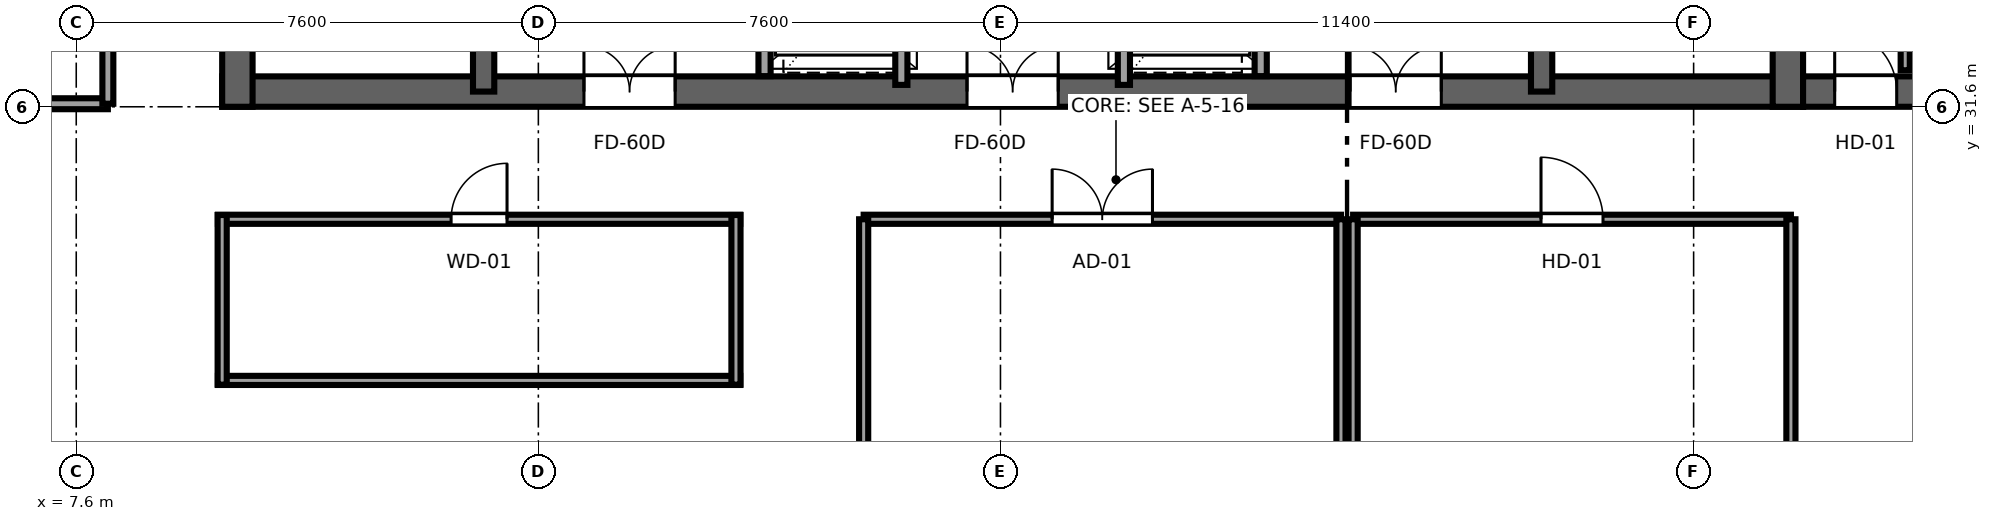
"""IFC4 building model, lengths in metres.
Left out: names, types, materials, properties, quantities, classifications, styles, units other than length and angle.
Written with IfcOpenShell. Run it as: python <this file> out.ifc"""

import sys

from ifc_helpers import new_model, si_unit, direction, frame, frame_2d, origin, place, context, subcontext, project, spatial, rectangle, extrude, source, transform, mapped, element, fill, save


model = new_model("IFC4")
c1 = context("Model", 3, precision=1e-05, world=origin(), true_north=direction((0.0, 1.0)))
c2 = subcontext(c1, "Body", "Model", "MODEL_VIEW")
j1 = project(units=[si_unit("LENGTHUNIT", "METRE"), si_unit("PLANEANGLEUNIT", "RADIAN")], contexts=[c1])
p1 = place(None, origin())
s1 = spatial("IfcSite", under=j1, at=p1, CompositionType="ELEMENT")
p2 = place(p1, origin())
s2 = spatial("IfcBuilding", under=s1, at=p2, CompositionType="ELEMENT")
p3 = place(p2, frame((0.0, 0.0, 234.55)))
s3 = spatial("IfcBuildingStorey", under=s2, at=p3, CompositionType="ELEMENT", Elevation=234.55)
p4 = place(p3, frame((10.0, 31.85, 0.0), z_axis=(0.0, 0.0, 1.0), x_axis=(1.0, 0.0, 0.0)))
e1 = element("IfcWall", 1, at=p4, inside=s3, PredefinedType="SHEAR", context=c2, shape_type="SweptSolid", body=[
    extrude(rectangle(XDim=26.0, YDim=0.5, at=frame_2d((13.0, 0.0))), origin(), (0.0, 0.0, 1.0), 3.55),
])
p5 = place(p4, frame((7.45, 0.0, 0.0), z_axis=(0.0, 0.0, 1.0), x_axis=(-1.0, 0.0, 0.0)))
e2 = element("IfcOpeningElement", 2, at=p5, cuts=e1, PredefinedType="OPENING", context=c2, shape_type="SweptSolid", body=[
    extrude(rectangle(XDim=1.5, YDim=2.04, at=frame_2d((0.75, 1.02))), frame((0.0, 0.26, 0.0), z_axis=(0.0, -1.0, 0.0), x_axis=(1.0, 0.0, 0.0)), (0.0, 0.0, 1.0), 0.52),
])
p6 = place(p4, frame((13.75, 0.0, 0.0), z_axis=(0.0, 0.0, 1.0), x_axis=(-1.0, 0.0, 0.0)))
e3 = element("IfcOpeningElement", 3, at=p6, cuts=e1, PredefinedType="OPENING", context=c2, shape_type="SweptSolid", body=[
    extrude(rectangle(XDim=1.5, YDim=2.04, at=frame_2d((0.75, 1.02))), frame((0.0, 0.26, 0.0), z_axis=(0.0, -1.0, 0.0), x_axis=(1.0, 0.0, 0.0)), (0.0, 0.0, 1.0), 0.52),
])
p7 = place(p4, frame((20.05, 0.0, 0.0), z_axis=(0.0, 0.0, 1.0), x_axis=(-1.0, 0.0, 0.0)))
e4 = element("IfcOpeningElement", 4, at=p7, cuts=e1, PredefinedType="OPENING", context=c2, shape_type="SweptSolid", body=[
    extrude(rectangle(XDim=1.5, YDim=2.04, at=frame_2d((0.75, 1.02))), frame((0.0, 0.26, 0.0), z_axis=(0.0, -1.0, 0.0), x_axis=(1.0, 0.0, 0.0)), (0.0, 0.0, 1.0), 0.52),
])
for number, where, z_axis, x_axis in (
    (5, (10.25, 31.6, 0.0), (0.0, 0.0, 1.0), (0.0, 1.0, 0.0)),
    (6, (35.75, 31.6, 0.0), (0.0, 0.0, 1.0), (0.0, 1.0, 0.0)),
):
    element("IfcWall", number, at=place(p3, frame(where, z_axis=z_axis, x_axis=x_axis)), inside=s3, PredefinedType="SHEAR", context=c2, shape_type="SweptSolid", body=[
        extrude(rectangle(XDim=13.6, YDim=0.5, at=frame_2d((6.8, 0.0))), origin(), (0.0, 0.0, 1.0), 3.55),
    ])
p8 = place(p3, frame((14.3, 31.85, 0.0), z_axis=(0.0, 0.0, 1.0), x_axis=(0.0, 1.0, 0.0)))
e7 = element("IfcWall", 7, at=p8, inside=s3, PredefinedType="SHEAR", context=c2, shape_type="SweptSolid", body=[
    extrude(rectangle(XDim=13.1, YDim=0.35, at=frame_2d((6.55, 0.0))), origin(), (0.0, 0.0, 1.0), 3.55),
])
p9 = place(p8, frame((0.7, 0.0, 0.0)))
e8 = element("IfcOpeningElement", 8, at=p9, cuts=e7, PredefinedType="OPENING", context=c2, shape_type="SweptSolid", body=[
    extrude(rectangle(XDim=1.1, YDim=2.12, at=frame_2d((0.55, 1.06))), frame((0.0, 0.185, 0.0), z_axis=(0.0, -1.0, 0.0), x_axis=(1.0, 0.0, 0.0)), (0.0, 0.0, 1.0), 0.37),
])
p10 = place(p3, frame((31.7, 31.85, 0.0), z_axis=(0.0, 0.0, 1.0), x_axis=(0.0, 1.0, 0.0)))
e9 = element("IfcWall", 9, at=p10, inside=s3, PredefinedType="SHEAR", context=c2, shape_type="SweptSolid", body=[
    extrude(rectangle(XDim=13.1, YDim=0.35, at=frame_2d((6.55, 0.0))), origin(), (0.0, 0.0, 1.0), 3.55),
])
p11 = place(p10, frame((1.8, 0.0, 0.0), z_axis=(0.0, 0.0, 1.0), x_axis=(-1.0, 0.0, 0.0)))
e10 = element("IfcOpeningElement", 10, at=p11, cuts=e9, PredefinedType="OPENING", context=c2, shape_type="SweptSolid", body=[
    extrude(rectangle(XDim=1.1, YDim=2.12, at=frame_2d((0.55, 1.06))), frame((0.0, 0.185, 0.0), z_axis=(0.0, -1.0, 0.0), x_axis=(1.0, 0.0, 0.0)), (0.0, 0.0, 1.0), 0.37),
])
p12 = place(p3, frame((36.0, 31.85, 0.0), z_axis=(0.0, 0.0, 1.0), x_axis=(1.0, 0.0, 0.0)))
e11 = element("IfcWall", 11, at=p12, inside=s3, PredefinedType="SHEAR", context=c2, shape_type="SweptSolid", body=[
    extrude(rectangle(XDim=3.8, YDim=0.5, at=frame_2d((1.9, 0.0))), origin(), (0.0, 0.0, 1.0), 3.55),
])
p13 = place(p12, frame((1.54, 0.0, 0.0), z_axis=(0.0, 0.0, 1.0), x_axis=(-1.0, 0.0, 0.0)))
e12 = element("IfcOpeningElement", 12, at=p13, cuts=e11, PredefinedType="OPENING", context=c2, shape_type="SweptSolid", body=[
    extrude(rectangle(XDim=1.02, YDim=2.03, at=frame_2d((0.51, 1.015))), frame((0.0, 0.26, 0.0), z_axis=(0.0, -1.0, 0.0), x_axis=(1.0, 0.0, 0.0)), (0.0, 0.0, 1.0), 0.52),
])
for number, where, z_axis, x_axis in (
    (13, (18.92, 32.104, 0.0), (0.0, 0.0, 1.0), (0.0, 1.0, 0.0)),
    (14, (27.08, 32.104, 0.0), (0.0, 0.0, 1.0), (0.0, 1.0, 0.0)),
):
    element("IfcWall", number, at=place(p3, frame(where, z_axis=z_axis, x_axis=x_axis)), inside=s3, PredefinedType="SOLIDWALL", context=c2, shape_type="SweptSolid", body=[
        extrude(rectangle(XDim=4.046, YDim=0.2, at=frame_2d((2.023, 0.0))), origin(), (0.0, 0.0, 1.0), 3.37),
    ])
p14 = place(p3, frame((21.17, 31.96, 0.0), z_axis=(0.0, 0.0, 1.0), x_axis=(0.0, 1.0, 0.0)))
e15 = element("IfcWall", 15, at=p14, inside=s3, PredefinedType="SOLIDWALL", context=c2, shape_type="SweptSolid", body=[
    extrude(rectangle(XDim=5.08, YDim=0.2, at=frame_2d((2.54, 0.0))), origin(), (0.0, 0.0, 1.0), 3.37),
])
p15 = place(p14, frame((0.74, 0.0, 0.0)))
e16 = element("IfcOpeningElement", 16, at=p15, cuts=e15, PredefinedType="OPENING", context=c2, shape_type="SweptSolid", body=[
    extrude(rectangle(XDim=1.1, YDim=2.12, at=frame_2d((0.55, 1.06))), frame((0.0, 0.11, 0.0), z_axis=(0.0, -1.0, 0.0), x_axis=(1.0, 0.0, 0.0)), (0.0, 0.0, 1.0), 0.22),
])
p16 = place(p14, frame((3.24, 0.0, 0.0)))
e17 = element("IfcOpeningElement", 17, at=p16, cuts=e15, PredefinedType="OPENING", context=c2, shape_type="SweptSolid", body=[
    extrude(rectangle(XDim=1.1, YDim=2.12, at=frame_2d((0.55, 1.06))), frame((0.0, 0.11, 0.0), z_axis=(0.0, -1.0, 0.0), x_axis=(1.0, 0.0, 0.0)), (0.0, 0.0, 1.0), 0.22),
])
p17 = place(p3, frame((24.83, 31.96, 0.0), z_axis=(0.0, 0.0, 1.0), x_axis=(0.0, 1.0, 0.0)))
e18 = element("IfcWall", 18, at=p17, inside=s3, PredefinedType="SOLIDWALL", context=c2, shape_type="SweptSolid", body=[
    extrude(rectangle(XDim=5.08, YDim=0.2, at=frame_2d((2.54, 0.0))), origin(), (0.0, 0.0, 1.0), 3.37),
])
p18 = place(p17, frame((0.74, 0.0, 0.0)))
e19 = element("IfcOpeningElement", 19, at=p18, cuts=e18, PredefinedType="OPENING", context=c2, shape_type="SweptSolid", body=[
    extrude(rectangle(XDim=1.1, YDim=2.12, at=frame_2d((0.55, 1.06))), frame((0.0, 0.11, 0.0), z_axis=(0.0, -1.0, 0.0), x_axis=(1.0, 0.0, 0.0)), (0.0, 0.0, 1.0), 0.22),
])
p19 = place(p17, frame((3.24, 0.0, 0.0)))
e20 = element("IfcOpeningElement", 20, at=p19, cuts=e18, PredefinedType="OPENING", context=c2, shape_type="SweptSolid", body=[
    extrude(rectangle(XDim=1.1, YDim=2.12, at=frame_2d((0.55, 1.06))), frame((0.0, 0.11, 0.0), z_axis=(0.0, -1.0, 0.0), x_axis=(1.0, 0.0, 0.0)), (0.0, 0.0, 1.0), 0.22),
])
p20 = place(p3, frame((37.68, 32.2, 0.0), z_axis=(0.0, 0.0, 1.0), x_axis=(0.0, 1.0, 0.0)))
e21 = element("IfcWall", 21, at=p20, inside=s3, PredefinedType="PARTITIONING", context=c2, shape_type="SweptSolid", body=[
    extrude(rectangle(XDim=8.0, YDim=0.15, at=frame_2d((4.0, 0.0))), origin(), (0.0, 0.0, 1.0), 3.37),
])
p21 = place(p20, frame((3.49, 0.0, 0.0)))
e22 = element("IfcOpeningElement", 22, at=p21, cuts=e21, PredefinedType="OPENING", context=c2, shape_type="SweptSolid", body=[
    extrude(rectangle(XDim=1.02, YDim=2.03, at=frame_2d((0.51, 1.015))), frame((0.0, 0.085, 0.0), z_axis=(0.0, -1.0, 0.0), x_axis=(1.0, 0.0, 0.0)), (0.0, 0.0, 1.0), 0.17),
])
p22 = place(p3, frame((3.005, 31.65, 0.0), z_axis=(0.0, 0.0, 1.0), x_axis=(1.0, 0.0, 0.0)))
e23 = element("IfcWall", 23, at=p22, inside=s3, PredefinedType="PARTITIONING", context=c2, shape_type="SweptSolid", body=[
    extrude(rectangle(XDim=5.115, YDim=0.18, at=frame_2d((2.558, 0.0))), origin(), (0.0, 0.0, 1.0), 3.37),
])
p23 = place(p3, frame((8.12, 31.65, 0.0), z_axis=(0.0, 0.0, 1.0), x_axis=(0.0, 1.0, 0.0)))
e24 = element("IfcWall", 24, at=p23, inside=s3, PredefinedType="PARTITIONING", context=c2, shape_type="SweptSolid", body=[
    extrude(rectangle(XDim=4.95, YDim=0.18, at=frame_2d((2.475, 0.0))), origin(), (0.0, 0.0, 1.0), 3.37),
])
p24 = place(p23, frame((3.0, 0.0, 0.0)))
e25 = element("IfcOpeningElement", 25, at=p24, cuts=e24, PredefinedType="OPENING", context=c2, shape_type="SweptSolid", body=[
    extrude(rectangle(XDim=1.65, YDim=2.15, at=frame_2d((0.825, 1.075))), frame((0.0, 0.1, 0.0), z_axis=(0.0, -1.0, 0.0), x_axis=(1.0, 0.0, 0.0)), (0.0, 0.0, 1.0), 0.2),
])
p25 = place(p3, frame((9.93, 27.1, 0.0), z_axis=(0.0, 0.0, 1.0), x_axis=(1.0, 0.0, 0.0)))
e26 = element("IfcWall", 26, at=p25, inside=s3, PredefinedType="PARTITIONING", context=c2, shape_type="SweptSolid", body=[
    extrude(rectangle(XDim=8.59, YDim=0.15, at=frame_2d((4.295, 0.0))), origin(), (0.0, 0.0, 1.0), 3.37),
])
p26 = place(p3, frame((9.93, 29.75, 0.0), z_axis=(0.0, 0.0, 1.0), x_axis=(1.0, 0.0, 0.0)))
e27 = element("IfcWall", 27, at=p26, inside=s3, PredefinedType="PARTITIONING", context=c2, shape_type="SweptSolid", body=[
    extrude(rectangle(XDim=8.59, YDim=0.15, at=frame_2d((4.295, 0.0))), origin(), (0.0, 0.0, 1.0), 3.37),
])
p27 = place(p26, frame((3.835, 0.0, 0.0)))
e28 = element("IfcOpeningElement", 28, at=p27, cuts=e27, PredefinedType="OPENING", context=c2, shape_type="SweptSolid", body=[
    extrude(rectangle(XDim=0.92, YDim=2.01, at=frame_2d((0.46, 1.005))), frame((0.0, 0.085, 0.0), z_axis=(0.0, -1.0, 0.0), x_axis=(1.0, 0.0, 0.0)), (0.0, 0.0, 1.0), 0.17),
])
for number, where, z_axis, x_axis in (
    (29, (10.0, 27.03, 0.0), (0.0, 0.0, 1.0), (0.0, 1.0, 0.0)),
    (30, (18.45, 27.03, 0.0), (0.0, 0.0, 1.0), (0.0, 1.0, 0.0)),
):
    element("IfcWall", number, at=place(p3, frame(where, z_axis=z_axis, x_axis=x_axis)), inside=s3, PredefinedType="PARTITIONING", context=c2, shape_type="SweptSolid", body=[
        extrude(rectangle(XDim=2.79, YDim=0.15, at=frame_2d((1.395, 0.0))), origin(), (0.0, 0.0, 1.0), 3.37),
    ])
p28 = place(p3, frame((20.55, 29.75, 0.0), z_axis=(0.0, 0.0, 1.0), x_axis=(1.0, 0.0, 0.0)))
e31 = element("IfcWall", 31, at=p28, inside=s3, PredefinedType="PARTITIONING", context=c2, shape_type="SweptSolid", body=[
    extrude(rectangle(XDim=7.85, YDim=0.15, at=frame_2d((3.925, 0.0))), origin(), (0.0, 0.0, 1.0), 3.37),
])
p29 = place(p28, frame((3.1, 0.0, 0.0)))
e32 = element("IfcOpeningElement", 32, at=p29, cuts=e31, PredefinedType="OPENING", context=c2, shape_type="SweptSolid", body=[
    extrude(rectangle(XDim=1.65, YDim=2.15, at=frame_2d((0.825, 1.075))), frame((0.0, 0.085, 0.0), z_axis=(0.0, -1.0, 0.0), x_axis=(1.0, 0.0, 0.0)), (0.0, 0.0, 1.0), 0.17),
])
p30 = place(p3, frame((20.55, 25.0, 0.0), z_axis=(0.0, 0.0, 1.0), x_axis=(0.0, 1.0, 0.0)))
e33 = element("IfcWall", 33, at=p30, inside=s3, PredefinedType="PARTITIONING", context=c2, shape_type="SweptSolid", body=[
    extrude(rectangle(XDim=4.75, YDim=0.15, at=frame_2d((2.375, 0.0))), origin(), (0.0, 0.0, 1.0), 3.37),
])
p31 = place(p3, frame((28.4, 25.0, 0.0), z_axis=(0.0, 0.0, 1.0), x_axis=(0.0, 1.0, 0.0)))
e34 = element("IfcWall", 34, at=p31, inside=s3, PredefinedType="PARTITIONING", context=c2, shape_type="SweptSolid", body=[
    extrude(rectangle(XDim=4.75, YDim=0.15, at=frame_2d((2.375, 0.0))), origin(), (0.0, 0.0, 1.0), 2.758),
])
p32 = place(p3, frame((28.6, 29.75, 0.0), z_axis=(0.0, 0.0, 1.0), x_axis=(1.0, 0.0, 0.0)))
e35 = element("IfcWall", 35, at=p32, inside=s3, PredefinedType="PARTITIONING", context=c2, shape_type="SweptSolid", body=[
    extrude(rectangle(XDim=7.2, YDim=0.15, at=frame_2d((3.6, 0.0))), origin(), (0.0, 0.0, 1.0), 3.37),
])
p33 = place(p32, frame((3.09, 0.0, 0.0)))
e36 = element("IfcOpeningElement", 36, at=p33, cuts=e35, PredefinedType="OPENING", context=c2, shape_type="SweptSolid", body=[
    extrude(rectangle(XDim=1.02, YDim=2.03, at=frame_2d((0.51, 1.015))), frame((0.0, 0.085, 0.0), z_axis=(0.0, -1.0, 0.0), x_axis=(1.0, 0.0, 0.0)), (0.0, 0.0, 1.0), 0.17),
])
p34 = place(p3, frame((28.6, 25.0, 0.0), z_axis=(0.0, 0.0, 1.0), x_axis=(0.0, 1.0, 0.0)))
e37 = element("IfcWall", 37, at=p34, inside=s3, PredefinedType="PARTITIONING", context=c2, shape_type="SweptSolid", body=[
    extrude(rectangle(XDim=4.75, YDim=0.15, at=frame_2d((2.375, 0.0))), origin(), (0.0, 0.0, 1.0), 2.758),
])
p35 = place(p3, frame((35.8, 25.0, 0.0), z_axis=(0.0, 0.0, 1.0), x_axis=(0.0, 1.0, 0.0)))
e38 = element("IfcWall", 38, at=p35, inside=s3, PredefinedType="PARTITIONING", context=c2, shape_type="SweptSolid", body=[
    extrude(rectangle(XDim=4.75, YDim=0.15, at=frame_2d((2.375, 0.0))), origin(), (0.0, 0.0, 1.0), 3.37),
])
m1 = source(origin(), c2, "Body", "SweptSolid", [
    extrude(rectangle(XDim=1.5, YDim=2.04, at=frame_2d((0.75, 1.02))), frame((0.0, 0.025, 0.0), z_axis=(0.0, -1.0, 0.0), x_axis=(1.0, 0.0, 0.0)), (0.0, 0.0, 1.0), 0.05),
])
p36 = place(p5, origin())
e39 = element("IfcDoor", 39, at=p36, inside=s3, OperationType="DOUBLE_DOOR_SINGLE_SWING", PredefinedType="DOOR", context=c2, shape_type="MappedRepresentation", body=[
    mapped(m1, transform((0.0, 0.0, 0.0), x_axis=(1.0, 0.0, 0.0), y_axis=(0.0, 1.0, 0.0), z_axis=(0.0, 0.0, 1.0), scale=1.0)),
])
fill(e2, e39)
p37 = place(p6, origin())
e40 = element("IfcDoor", 40, at=p37, inside=s3, OperationType="DOUBLE_DOOR_SINGLE_SWING", PredefinedType="DOOR", context=c2, shape_type="MappedRepresentation", body=[
    mapped(m1, transform((0.0, 0.0, 0.0), x_axis=(1.0, 0.0, 0.0), y_axis=(0.0, 1.0, 0.0), z_axis=(0.0, 0.0, 1.0), scale=1.0)),
])
fill(e3, e40)
p38 = place(p7, origin())
e41 = element("IfcDoor", 41, at=p38, inside=s3, OperationType="DOUBLE_DOOR_SINGLE_SWING", PredefinedType="DOOR", context=c2, shape_type="MappedRepresentation", body=[
    mapped(m1, transform((0.0, 0.0, 0.0), x_axis=(1.0, 0.0, 0.0), y_axis=(0.0, 1.0, 0.0), z_axis=(0.0, 0.0, 1.0), scale=1.0)),
])
fill(e4, e41)
m2 = source(origin(), c2, "Body", "SweptSolid", [
    extrude(rectangle(XDim=1.02, YDim=2.03, at=frame_2d((0.51, 1.015))), frame((0.0, 0.025, 0.0), z_axis=(0.0, -1.0, 0.0), x_axis=(1.0, 0.0, 0.0)), (0.0, 0.0, 1.0), 0.05),
])
p39 = place(p13, origin())
e42 = element("IfcDoor", 42, at=p39, inside=s3, OperationType="SINGLE_SWING_LEFT", PredefinedType="DOOR", context=c2, shape_type="MappedRepresentation", body=[
    mapped(m2, transform((0.0, 0.0, 0.0), x_axis=(1.0, 0.0, 0.0), y_axis=(0.0, 1.0, 0.0), z_axis=(0.0, 0.0, 1.0), scale=1.0)),
])
fill(e12, e42)
m3 = source(origin(), c2, "Body", "SweptSolid", [
    extrude(rectangle(XDim=0.92, YDim=2.01, at=frame_2d((0.46, 1.005))), frame((0.0, 0.025, 0.0), z_axis=(0.0, -1.0, 0.0), x_axis=(1.0, 0.0, 0.0)), (0.0, 0.0, 1.0), 0.05),
])
p40 = place(p27, origin())
e43 = element("IfcDoor", 43, at=p40, inside=s3, OperationType="SINGLE_SWING_RIGHT", PredefinedType="DOOR", context=c2, shape_type="MappedRepresentation", body=[
    mapped(m3, transform((0.0, 0.0, 0.0), x_axis=(1.0, 0.0, 0.0), y_axis=(0.0, 1.0, 0.0), z_axis=(0.0, 0.0, 1.0), scale=1.0)),
])
fill(e28, e43)
m4 = source(origin(), c2, "Body", "SweptSolid", [
    extrude(rectangle(XDim=1.65, YDim=2.15, at=frame_2d((0.825, 1.075))), frame((0.0, 0.025, 0.0), z_axis=(0.0, -1.0, 0.0), x_axis=(1.0, 0.0, 0.0)), (0.0, 0.0, 1.0), 0.05),
])
p41 = place(p29, origin())
e44 = element("IfcDoor", 44, at=p41, inside=s3, OperationType="DOUBLE_DOOR_SINGLE_SWING", PredefinedType="DOOR", context=c2, shape_type="MappedRepresentation", body=[
    mapped(m4, transform((0.0, 0.0, 0.0), x_axis=(1.0, 0.0, 0.0), y_axis=(0.0, 1.0, 0.0), z_axis=(0.0, 0.0, 1.0), scale=1.0)),
])
fill(e32, e44)
p42 = place(p33, origin())
e45 = element("IfcDoor", 45, at=p42, inside=s3, OperationType="SINGLE_SWING_LEFT", PredefinedType="DOOR", context=c2, shape_type="MappedRepresentation", body=[
    mapped(m2, transform((0.0, 0.0, 0.0), x_axis=(1.0, 0.0, 0.0), y_axis=(0.0, 1.0, 0.0), z_axis=(0.0, 0.0, 1.0), scale=1.0)),
])
fill(e36, e45)
save(model, sys.argv[1])
